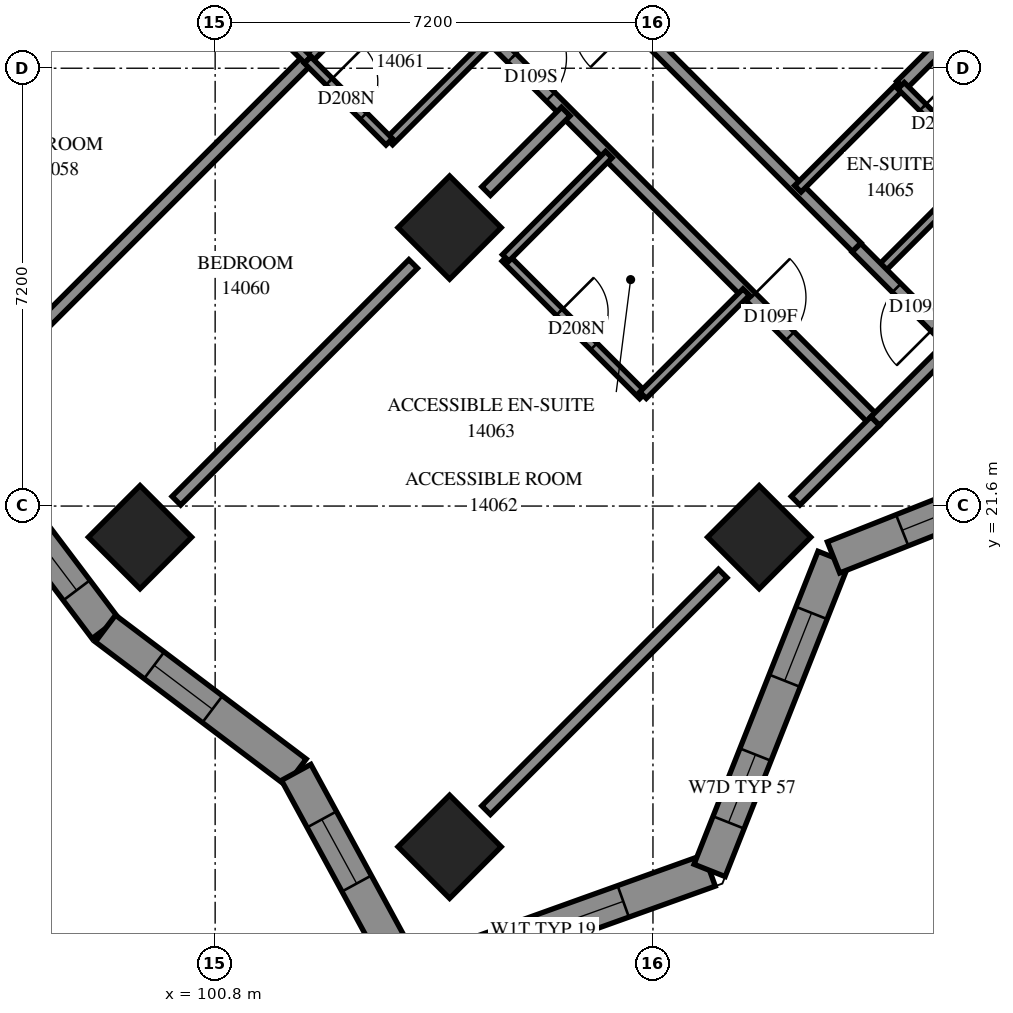
"""IFC4 building model, lengths in metres.
Left out: names, types, materials, properties, quantities, classifications, styles, units other than length and angle.
Written with IfcOpenShell. Run it as: python <this file> out.ifc"""

import sys

from ifc_helpers import new_model, si_unit, direction, frame, frame_2d, origin, origin_2d, place, context, subcontext, project, spatial, polyline, rectangle, outline, extrude, element, fill, save


model = new_model("IFC4")
c1 = context("Model", 3, precision=1e-05, world=origin(), true_north=direction((0.0, 1.0)))
c2 = subcontext(c1, "Body", "Model", "MODEL_VIEW")
j1 = project(units=[si_unit("LENGTHUNIT", "METRE"), si_unit("PLANEANGLEUNIT", "RADIAN")], contexts=[c1])
p1 = place(None, origin())
s1 = spatial("IfcSite", under=j1, at=p1, CompositionType="ELEMENT")
p2 = place(p1, origin())
s2 = spatial("IfcBuilding", under=s1, at=p2, CompositionType="ELEMENT")
p3 = place(p2, frame((0.0, 0.0, 54.2)))
s3 = spatial("IfcBuildingStorey", under=s2, at=p3, CompositionType="ELEMENT", Elevation=54.2)
for number, where, z_axis, x_axis in (
    (1, (104.656, 26.18, 0.0), (0.0, 0.0, 1.0), (0.707, -0.707, 0.0)),
    (2, (99.565, 21.088, 0.0), (0.0, 0.0, 1.0), (0.707, -0.707, 0.0)),
    (3, (109.747, 21.088, 0.0), (0.0, 0.0, 1.0), (0.707, -0.707, 0.0)),
    (4, (104.656, 15.997, 0.0), (0.0, 0.0, 1.0), (0.707, -0.707, 0.0)),
):
    element("IfcColumn", number, at=place(p3, frame(where, z_axis=z_axis, x_axis=x_axis)), inside=s3, PredefinedType="COLUMN", context=c2, shape_type="SweptSolid", body=[
        extrude(rectangle(XDim=1.2, YDim=1.2, at=origin_2d()), origin(), (0.0, 0.0, 1.0), 3.1),
    ])
p4 = place(p3, frame((103.977, 13.831, 0.0), z_axis=(0.0, 0.0, 1.0), x_axis=(0.9412569304, 0.3376912656, 0.0)))
e5 = element("IfcWall", 5, at=p4, inside=s3, PredefinedType="SOLIDWALL", context=c2, shape_type="SweptSolid", body=[
    extrude(outline(polyline([(-0.236, -0.275), (5.388, -0.275), (5.139, 0.275), (0.236, 0.275), (-0.236, -0.275)])), origin(), (0.0, 0.0, 1.0), 3.1),
])
p5 = place(p4, frame((0.955, 0.0, 0.5)))
e6 = element("IfcOpeningElement", 6, at=p5, cuts=e5, PredefinedType="OPENING", context=c2, shape_type="SweptSolid", body=[
    extrude(rectangle(XDim=2.8, YDim=2.45, at=frame_2d((1.4, 1.225))), frame((0.0, 0.285, 0.0), z_axis=(0.0, -1.0, 0.0), x_axis=(1.0, 0.0, 0.0)), (0.0, 0.0, 1.0), 0.57),
])
p6 = place(p3, frame((108.931, 15.608, 0.0), z_axis=(0.0, 0.0, 1.0), x_axis=(0.368236509, 0.9297321514, 0.0)))
e7 = element("IfcWall", 7, at=p6, inside=s3, PredefinedType="SOLIDWALL", context=c2, shape_type="SweptSolid", body=[
    extrude(outline(polyline([(-0.124, -0.275), (5.417, -0.275), (5.655, 0.275), (0.124, 0.275), (-0.124, -0.275)])), origin(), (0.0, 0.0, 1.0), 3.1),
])
p7 = place(p6, frame((0.848, 0.0, 0.5)))
e8 = element("IfcOpeningElement", 8, at=p7, cuts=e7, PredefinedType="OPENING", context=c2, shape_type="SweptSolid", body=[
    extrude(rectangle(XDim=1.2, YDim=2.45, at=frame_2d((0.6, 1.225))), frame((0.0, 0.285, 0.0), z_axis=(0.0, -1.0, 0.0), x_axis=(1.0, 0.0, 0.0)), (0.0, 0.0, 1.0), 0.57),
])
p8 = place(p6, frame((3.354, 0.0, 0.5)))
e9 = element("IfcOpeningElement", 9, at=p8, cuts=e7, PredefinedType="OPENING", context=c2, shape_type="SweptSolid", body=[
    extrude(rectangle(XDim=1.2, YDim=2.45, at=frame_2d((0.6, 1.225))), frame((0.0, 0.285, 0.0), z_axis=(0.0, -1.0, 0.0), x_axis=(1.0, 0.0, 0.0)), (0.0, 0.0, 1.0), 0.57),
])
p9 = place(p3, frame((110.97, 20.755, 0.0), z_axis=(0.0, 0.0, 1.0), x_axis=(0.9297346009, 0.3682303244, 0.0)))
e10 = element("IfcWall", 10, at=p9, inside=s3, PredefinedType="SOLIDWALL", context=c2, shape_type="SweptSolid", body=[
    extrude(outline(polyline([(0.119, -0.275), (5.66, -0.275), (5.411, 0.275), (-0.119, 0.275), (0.119, -0.275)])), origin(), (0.0, 0.0, 1.0), 3.1),
])
p10 = place(p9, frame((1.214, 0.0, 0.5)))
e11 = element("IfcOpeningElement", 11, at=p10, cuts=e10, PredefinedType="OPENING", context=c2, shape_type="SweptSolid", body=[
    extrude(rectangle(XDim=2.8, YDim=2.45, at=frame_2d((1.4, 1.225))), frame((0.0, 0.285, 0.0), z_axis=(0.0, -1.0, 0.0), x_axis=(1.0, 0.0, 0.0)), (0.0, 0.0, 1.0), 0.57),
])
p11 = place(p3, frame((96.642, 22.706, 0.0), z_axis=(0.0, 0.0, 1.0), x_axis=(0.6022004799, -0.7983449017, 0.0)))
e12 = element("IfcWall", 12, at=p11, inside=s3, PredefinedType="SOLIDWALL", context=c2, shape_type="SweptSolid", body=[
    extrude(outline(polyline([(0.038, -0.275), (3.946, -0.275), (3.869, 0.275), (-0.038, 0.275), (0.038, -0.275)])), origin(), (0.0, 0.0, 1.0), 3.1),
])
p12 = place(p11, frame((0.321, 0.0, 0.5)))
e13 = element("IfcOpeningElement", 13, at=p12, cuts=e12, PredefinedType="OPENING", context=c2, shape_type="SweptSolid", body=[
    extrude(rectangle(XDim=2.8, YDim=2.45, at=frame_2d((1.4, 1.225))), frame((0.0, 0.285, 0.0), z_axis=(0.0, -1.0, 0.0), x_axis=(1.0, 0.0, 0.0)), (0.0, 0.0, 1.0), 0.57),
])
p13 = place(p3, frame((98.996, 19.586, 0.0), z_axis=(0.0, 0.0, 1.0), x_axis=(0.7983537644, -0.6021887302, 0.0)))
e14 = element("IfcWall", 14, at=p13, inside=s3, PredefinedType="SOLIDWALL", context=c2, shape_type="SweptSolid", body=[
    extrude(outline(polyline([(-0.038, -0.275), (3.869, -0.275), (3.988, 0.275), (0.038, 0.275), (-0.038, -0.275)])), origin(), (0.0, 0.0, 1.0), 3.1),
])
p14 = place(p13, frame((1.004, 0.0, 0.5)))
e15 = element("IfcOpeningElement", 15, at=p14, cuts=e14, PredefinedType="OPENING", context=c2, shape_type="SweptSolid", body=[
    extrude(rectangle(XDim=1.2, YDim=2.45, at=frame_2d((0.6, 1.225))), frame((0.0, 0.285, 0.0), z_axis=(0.0, -1.0, 0.0), x_axis=(1.0, 0.0, 0.0)), (0.0, 0.0, 1.0), 0.57),
])
p15 = place(p3, frame((102.132, 17.22, 0.0), z_axis=(0.0, 0.0, 1.0), x_axis=(0.478060323, -0.8783270049, 0.0)))
e16 = element("IfcWall", 16, at=p15, inside=s3, PredefinedType="SOLIDWALL", context=c2, shape_type="SweptSolid", body=[
    extrude(outline(polyline([(0.059, -0.275), (4.095, -0.275), (3.623, 0.275), (-0.059, 0.275), (0.059, -0.275)])), origin(), (0.0, 0.0, 1.0), 3.1),
])
p16 = place(p15, frame((0.881, 0.0, 0.5)))
e17 = element("IfcOpeningElement", 17, at=p16, cuts=e16, PredefinedType="OPENING", context=c2, shape_type="SweptSolid", body=[
    extrude(rectangle(XDim=1.2, YDim=2.45, at=frame_2d((0.6, 1.225))), frame((0.0, 0.285, 0.0), z_axis=(0.0, -1.0, 0.0), x_axis=(1.0, 0.0, 0.0)), (0.0, 0.0, 1.0), 0.57),
])
p17 = place(p3, frame((93.481, 41.167, 0.0), z_axis=(0.0, 0.0, 1.0), x_axis=(0.7071067812, -0.7071067812, 0.0)))
e18 = element("IfcWall", 18, at=p17, inside=s3, PredefinedType="PARTITIONING", context=c2, shape_type="SweptSolid", body=[
    extrude(rectangle(XDim=25.699, YDim=0.2, at=frame_2d((12.85, 0.0))), origin(), (0.0, 0.0, 1.0), 3.1),
])
p18 = place(p17, frame((2.8, 0.0, 0.0)))
e19 = element("IfcOpeningElement", 19, at=p18, cuts=e18, PredefinedType="OPENING", context=c2, shape_type="SweptSolid", body=[
    extrude(rectangle(XDim=0.9, YDim=2.1, at=frame_2d((0.45, 1.05))), frame((0.0, 0.11, 0.0), z_axis=(0.0, -1.0, 0.0), x_axis=(1.0, 0.0, 0.0)), (0.0, 0.0, 1.0), 0.22),
])
p19 = place(p17, frame((9.948, 0.0, 0.0)))
e20 = element("IfcOpeningElement", 20, at=p19, cuts=e18, PredefinedType="OPENING", context=c2, shape_type="SweptSolid", body=[
    extrude(rectangle(XDim=0.9, YDim=2.1, at=frame_2d((0.45, 1.05))), frame((0.0, 0.11, 0.0), z_axis=(0.0, -1.0, 0.0), x_axis=(1.0, 0.0, 0.0)), (0.0, 0.0, 1.0), 0.22),
])
p20 = place(p17, frame((11.7, 0.0, 0.0)))
e21 = element("IfcOpeningElement", 21, at=p20, cuts=e18, PredefinedType="OPENING", context=c2, shape_type="SweptSolid", body=[
    extrude(rectangle(XDim=0.9, YDim=2.1, at=frame_2d((0.45, 1.05))), frame((0.0, 0.11, 0.0), z_axis=(0.0, -1.0, 0.0), x_axis=(1.0, 0.0, 0.0)), (0.0, 0.0, 1.0), 0.22),
])
p21 = place(p17, frame((17.25, 0.0, 0.0)))
e22 = element("IfcOpeningElement", 22, at=p21, cuts=e18, PredefinedType="OPENING", context=c2, shape_type="SweptSolid", body=[
    extrude(rectangle(XDim=0.9, YDim=2.1, at=frame_2d((0.45, 1.05))), frame((0.0, 0.11, 0.0), z_axis=(0.0, -1.0, 0.0), x_axis=(1.0, 0.0, 0.0)), (0.0, 0.0, 1.0), 0.22),
])
p22 = place(p17, frame((22.82, 0.0, 0.0)))
e23 = element("IfcOpeningElement", 23, at=p22, cuts=e18, PredefinedType="OPENING", context=c2, shape_type="SweptSolid", body=[
    extrude(rectangle(XDim=0.9, YDim=2.1, at=frame_2d((0.45, 1.05))), frame((0.0, 0.11, 0.0), z_axis=(0.0, -1.0, 0.0), x_axis=(1.0, 0.0, 0.0)), (0.0, 0.0, 1.0), 0.22),
])
p23 = place(p3, frame((111.352, 25.855, 0.0), z_axis=(0.0, 0.0, 1.0), x_axis=(-0.7070418597, 0.7071716967, 0.0)))
e24 = element("IfcWall", 24, at=p23, inside=s3, PredefinedType="PARTITIONING", context=c2, shape_type="SweptSolid", body=[
    extrude(rectangle(XDim=13.864, YDim=0.2, at=frame_2d((6.932, 0.0))), origin(), (0.0, 0.0, 1.0), 3.1),
])
p24 = place(p23, frame((12.564, 0.0, 0.0)))
e25 = element("IfcOpeningElement", 25, at=p24, cuts=e24, PredefinedType="OPENING", context=c2, shape_type="SweptSolid", body=[
    extrude(rectangle(XDim=0.9, YDim=2.1, at=frame_2d((0.45, 1.05))), frame((0.0, 0.11, 0.0), z_axis=(0.0, -1.0, 0.0), x_axis=(1.0, 0.0, 0.0)), (0.0, 0.0, 1.0), 0.22),
])
p25 = place(p23, frame((5.19, 0.0, 0.0)))
e26 = element("IfcOpeningElement", 26, at=p25, cuts=e24, PredefinedType="OPENING", context=c2, shape_type="SweptSolid", body=[
    extrude(rectangle(XDim=1.0, YDim=2.1, at=frame_2d((0.5, 1.05))), frame((0.0, 0.11, 0.0), z_axis=(0.0, -1.0, 0.0), x_axis=(1.0, 0.0, 0.0)), (0.0, 0.0, 1.0), 0.22),
])
p26 = place(p3, frame((96.524, 23.14, 0.0), z_axis=(0.0, 0.0, 1.0), x_axis=(0.7071128779, 0.7071006844, 0.0)))
e27 = element("IfcWall", 27, at=p26, inside=s3, PredefinedType="PARTITIONING", context=c2, shape_type="SweptSolid", body=[
    extrude(rectangle(XDim=8.201, YDim=0.2, at=frame_2d((4.101, 0.0))), origin(), (0.0, 0.0, 1.0), 3.1),
])
p27 = place(p3, frame((100.162, 21.688, 0.0), z_axis=(0.0, 0.0, 1.0), x_axis=(0.7071067812, 0.7071067812, 0.0)))
e28 = element("IfcWall", 28, at=p27, inside=s3, PredefinedType="PARTITIONING", context=c2, shape_type="SweptSolid", body=[
    extrude(rectangle(XDim=5.507, YDim=0.2, at=frame_2d((2.753, 0.0))), origin(), (0.0, 0.0, 1.0), 3.1),
])
p28 = place(p3, frame((105.255, 16.599, 0.0), z_axis=(0.0, 0.0, 1.0), x_axis=(0.7071067812, 0.7071067812, 0.0)))
e29 = element("IfcWall", 29, at=p28, inside=s3, PredefinedType="PARTITIONING", context=c2, shape_type="SweptSolid", body=[
    extrude(rectangle(XDim=5.504, YDim=0.2, at=frame_2d((2.752, 0.0))), origin(), (0.0, 0.0, 1.0), 2.6),
])
p29 = place(p3, frame((95.073, 26.781, 0.0), z_axis=(0.0, 0.0, 1.0), x_axis=(0.7071067812, 0.7071067812, 0.0)))
e30 = element("IfcWall", 30, at=p29, inside=s3, PredefinedType="PARTITIONING", context=c2, shape_type="SweptSolid", body=[
    extrude(rectangle(XDim=5.501, YDim=0.2, at=frame_2d((2.751, 0.0))), origin(), (0.0, 0.0, 1.0), 3.1),
])
p30 = place(p3, frame((112.079, 28.513, 0.0), z_axis=(0.0, 0.0, 1.0), x_axis=(0.7071067812, 0.7071067812, 0.0)))
e31 = element("IfcWall", 31, at=p30, inside=s3, PredefinedType="PARTITIONING", context=c2, shape_type="SweptSolid", body=[
    extrude(rectangle(XDim=3.351, YDim=0.2, at=frame_2d((1.675, 0.0))), origin(), (0.0, 0.0, 1.0), 3.1),
])
p31 = place(p3, frame((105.573, 25.681, 0.0), z_axis=(0.0, 0.0, 1.0), x_axis=(0.7071067812, -0.7071067812, 0.0)))
e32 = element("IfcWall", 32, at=p31, inside=s3, PredefinedType="PARTITIONING", context=c2, shape_type="SweptSolid", body=[
    extrude(rectangle(XDim=3.199, YDim=0.15, at=frame_2d((1.599, 0.0))), origin(), (0.0, 0.0, 1.0), 3.1),
])
p32 = place(p31, frame((1.258, 0.0, 0.0)))
e33 = element("IfcOpeningElement", 33, at=p32, cuts=e32, PredefinedType="OPENING", context=c2, shape_type="SweptSolid", body=[
    extrude(rectangle(XDim=0.8, YDim=2.1, at=frame_2d((0.4, 1.05))), frame((0.0, 0.085, 0.0), z_axis=(0.0, -1.0, 0.0), x_axis=(1.0, 0.0, 0.0)), (0.0, 0.0, 1.0), 0.17),
])
p33 = place(p3, frame((111.725, 25.473, 0.0), z_axis=(0.0, 0.0, 1.0), x_axis=(0.7071067812, 0.7071067812, 0.0)))
e34 = element("IfcWall", 34, at=p33, inside=s3, PredefinedType="PARTITIONING", context=c2, shape_type="SweptSolid", body=[
    extrude(rectangle(XDim=2.401, YDim=0.15, at=frame_2d((1.201, 0.0))), origin(), (0.0, 0.0, 1.0), 3.1),
])
p34 = place(p3, frame((105.578, 25.682, 0.0), z_axis=(0.0, 0.0, 1.0), x_axis=(0.706689978, 0.7075233388, 0.0)))
e35 = element("IfcWall", 35, at=p34, inside=s3, PredefinedType="PARTITIONING", context=c2, shape_type="SweptSolid", body=[
    extrude(rectangle(XDim=2.4, YDim=0.15, at=frame_2d((1.2, 0.0))), origin(), (0.0, 0.0, 1.0), 3.1),
])
for number, where, z_axis, x_axis in (
    (36, (110.383, 26.817, 0.0), (0.0, 0.0, 1.0), (0.707, 0.707, 0.0)),
    (37, (102.323, 28.939, 0.0), (0.0, 0.0, 1.0), (0.707, 0.707, 0.0)),
    (38, (103.665, 27.595, 0.0), (0.0, 0.0, 1.0), (0.707, 0.707, 0.0)),
    (39, (107.837, 23.423, 0.0), (0.0, 0.0, 1.0), (0.707, 0.707, 0.0)),
):
    element("IfcWall", number, at=place(p3, frame(where, z_axis=z_axis, x_axis=x_axis)), inside=s3, PredefinedType="PARTITIONING", context=c2, shape_type="SweptSolid", body=[
        extrude(rectangle(XDim=2.398, YDim=0.15, at=frame_2d((1.199, 0.0))), origin(), (0.0, 0.0, 1.0), 3.1),
    ])
p35 = place(p3, frame((112.925, 24.267, 0.0), z_axis=(0.0, 0.0, 1.0), x_axis=(-0.7068383786, 0.707375082, 0.0)))
e40 = element("IfcWall", 40, at=p35, inside=s3, PredefinedType="PARTITIONING", context=c2, shape_type="SweptSolid", body=[
    extrude(rectangle(XDim=2.236, YDim=0.2, at=frame_2d((1.118, 0.0))), origin(), (0.0, 0.0, 1.0), 3.1),
])
p36 = place(p35, frame((0.4, 0.0, 0.0)))
e41 = element("IfcOpeningElement", 41, at=p36, cuts=e40, PredefinedType="OPENING", context=c2, shape_type="SweptSolid", body=[
    extrude(rectangle(XDim=0.9, YDim=2.1, at=frame_2d((0.45, 1.05))), frame((0.0, 0.11, 0.0), z_axis=(0.0, -1.0, 0.0), x_axis=(1.0, 0.0, 0.0)), (0.0, 0.0, 1.0), 0.22),
])
p37 = place(p3, frame((100.981, 30.283, 0.0), z_axis=(0.0, 0.0, 1.0), x_axis=(0.7076330979, -0.7065800724, 0.0)))
e42 = element("IfcWall", 42, at=p37, inside=s3, PredefinedType="PARTITIONING", context=c2, shape_type="SweptSolid", body=[
    extrude(rectangle(XDim=1.899, YDim=0.15, at=frame_2d((0.95, 0.0))), origin(), (0.0, 0.0, 1.0), 3.1),
])
p38 = place(p37, frame((0.493, 0.0, 0.0)))
e43 = element("IfcOpeningElement", 43, at=p38, cuts=e42, PredefinedType="OPENING", context=c2, shape_type="SweptSolid", body=[
    extrude(rectangle(XDim=0.8, YDim=2.1, at=frame_2d((0.4, 1.05))), frame((0.0, 0.085, 0.0), z_axis=(0.0, -1.0, 0.0), x_axis=(1.0, 0.0, 0.0)), (0.0, 0.0, 1.0), 0.17),
])
p39 = place(p3, frame((102.321, 28.935, 0.0), z_axis=(0.0, 0.0, 1.0), x_axis=(0.7065800724, -0.7076330979, 0.0)))
e44 = element("IfcWall", 44, at=p39, inside=s3, PredefinedType="PARTITIONING", context=c2, shape_type="SweptSolid", body=[
    extrude(rectangle(XDim=1.899, YDim=0.15, at=frame_2d((0.95, 0.0))), origin(), (0.0, 0.0, 1.0), 3.1),
])
p40 = place(p39, frame((0.501, 0.0, 0.0)))
e45 = element("IfcOpeningElement", 45, at=p40, cuts=e44, PredefinedType="OPENING", context=c2, shape_type="SweptSolid", body=[
    extrude(rectangle(XDim=0.8, YDim=2.1, at=frame_2d((0.4, 1.05))), frame((0.0, 0.085, 0.0), z_axis=(0.0, -1.0, 0.0), x_axis=(1.0, 0.0, 0.0)), (0.0, 0.0, 1.0), 0.17),
])
p41 = place(p3, frame((112.08, 28.512, 0.0), z_axis=(0.0, 0.0, 1.0), x_axis=(0.7076330979, -0.7065800724, 0.0)))
e46 = element("IfcWall", 46, at=p41, inside=s3, PredefinedType="PARTITIONING", context=c2, shape_type="SweptSolid", body=[
    extrude(rectangle(XDim=1.899, YDim=0.15, at=frame_2d((0.95, 0.0))), origin(), (0.0, 0.0, 1.0), 3.1),
])
p42 = place(p41, frame((0.505, 0.0, 0.0)))
e47 = element("IfcOpeningElement", 47, at=p42, cuts=e46, PredefinedType="OPENING", context=c2, shape_type="SweptSolid", body=[
    extrude(rectangle(XDim=0.8, YDim=2.1, at=frame_2d((0.4, 1.05))), frame((0.0, 0.085, 0.0), z_axis=(0.0, -1.0, 0.0), x_axis=(1.0, 0.0, 0.0)), (0.0, 0.0, 1.0), 0.17),
])
p43 = place(p3, frame((110.346, 21.689, 0.0), z_axis=(0.0, 0.0, 1.0), x_axis=(0.7071067812, 0.7071067812, 0.0)))
e48 = element("IfcWall", 48, at=p43, inside=s3, PredefinedType="PARTITIONING", context=c2, shape_type="SweptSolid", body=[
    extrude(rectangle(XDim=1.853, YDim=0.2, at=frame_2d((0.926, 0.0))), origin(), (0.0, 0.0, 1.0), 2.6),
])
p44 = place(p3, frame((105.256, 26.78, 0.0), z_axis=(0.0, 0.0, 1.0), x_axis=(0.7076467632, 0.7065663865, 0.0)))
e49 = element("IfcWall", 49, at=p44, inside=s3, PredefinedType="PARTITIONING", context=c2, shape_type="SweptSolid", body=[
    extrude(rectangle(XDim=1.851, YDim=0.2, at=frame_2d((0.926, 0.0))), origin(), (0.0, 0.0, 1.0), 3.1),
])
p45 = place(p3, frame((111.656, 22.998, 0.0), z_axis=(0.0, 0.0, 1.0), x_axis=(0.7071067812, 0.7071067812, 0.0)))
e50 = element("IfcWall", 50, at=p45, inside=s3, PredefinedType="PARTITIONING", context=c2, shape_type="SweptSolid", body=[
    extrude(rectangle(XDim=1.799, YDim=0.2, at=frame_2d((0.899, 0.0))), origin(), (0.0, 0.0, 1.0), 2.6),
])
p46 = place(p5, origin())
e51 = element("IfcWindow", 51, at=p46, inside=s3, PartitioningType="SINGLE_PANEL", PredefinedType="WINDOW", context=c2, shape_type="SweptSolid", body=[
    extrude(rectangle(XDim=2.8, YDim=2.45, at=frame_2d((1.4, 1.225))), frame((0.0, 0.155, 0.0), z_axis=(0.0, -1.0, 0.0), x_axis=(1.0, 0.0, 0.0)), (0.0, 0.0, 1.0), 0.06),
])
fill(e6, e51)
p47 = place(p7, origin())
e52 = element("IfcWindow", 52, at=p47, inside=s3, PartitioningType="SINGLE_PANEL", PredefinedType="WINDOW", context=c2, shape_type="SweptSolid", body=[
    extrude(rectangle(XDim=1.2, YDim=2.45, at=frame_2d((0.6, 1.225))), frame((0.0, 0.155, 0.0), z_axis=(0.0, -1.0, 0.0), x_axis=(1.0, 0.0, 0.0)), (0.0, 0.0, 1.0), 0.06),
])
fill(e8, e52)
p48 = place(p8, origin())
e53 = element("IfcWindow", 53, at=p48, inside=s3, PartitioningType="SINGLE_PANEL", PredefinedType="WINDOW", context=c2, shape_type="SweptSolid", body=[
    extrude(rectangle(XDim=1.2, YDim=2.45, at=frame_2d((0.6, 1.225))), frame((0.0, 0.155, 0.0), z_axis=(0.0, -1.0, 0.0), x_axis=(1.0, 0.0, 0.0)), (0.0, 0.0, 1.0), 0.06),
])
fill(e9, e53)
p49 = place(p10, origin())
e54 = element("IfcWindow", 54, at=p49, inside=s3, PartitioningType="SINGLE_PANEL", PredefinedType="WINDOW", context=c2, shape_type="SweptSolid", body=[
    extrude(rectangle(XDim=2.8, YDim=2.45, at=frame_2d((1.4, 1.225))), frame((0.0, 0.155, 0.0), z_axis=(0.0, -1.0, 0.0), x_axis=(1.0, 0.0, 0.0)), (0.0, 0.0, 1.0), 0.06),
])
fill(e11, e54)
p50 = place(p12, origin())
e55 = element("IfcWindow", 55, at=p50, inside=s3, PartitioningType="SINGLE_PANEL", PredefinedType="WINDOW", context=c2, shape_type="SweptSolid", body=[
    extrude(rectangle(XDim=2.8, YDim=2.45, at=frame_2d((1.4, 1.225))), frame((0.0, 0.155, 0.0), z_axis=(0.0, -1.0, 0.0), x_axis=(1.0, 0.0, 0.0)), (0.0, 0.0, 1.0), 0.06),
])
fill(e13, e55)
p51 = place(p14, origin())
e56 = element("IfcWindow", 56, at=p51, inside=s3, PartitioningType="SINGLE_PANEL", PredefinedType="WINDOW", context=c2, shape_type="SweptSolid", body=[
    extrude(rectangle(XDim=1.2, YDim=2.45, at=frame_2d((0.6, 1.225))), frame((0.0, 0.155, 0.0), z_axis=(0.0, -1.0, 0.0), x_axis=(1.0, 0.0, 0.0)), (0.0, 0.0, 1.0), 0.06),
])
fill(e15, e56)
p52 = place(p16, origin())
e57 = element("IfcWindow", 57, at=p52, inside=s3, PartitioningType="SINGLE_PANEL", PredefinedType="WINDOW", context=c2, shape_type="SweptSolid", body=[
    extrude(rectangle(XDim=1.2, YDim=2.45, at=frame_2d((0.6, 1.225))), frame((0.0, 0.155, 0.0), z_axis=(0.0, -1.0, 0.0), x_axis=(1.0, 0.0, 0.0)), (0.0, 0.0, 1.0), 0.06),
])
fill(e17, e57)
p53 = place(p21, origin())
e58 = element("IfcDoor", 58, at=p53, inside=s3, OperationType="SINGLE_SWING_LEFT", PredefinedType="DOOR", context=c2, shape_type="SweptSolid", body=[
    extrude(rectangle(XDim=0.9, YDim=2.1, at=frame_2d((0.45, 1.05))), frame((0.0, 0.025, 0.0), z_axis=(0.0, -1.0, 0.0), x_axis=(1.0, 0.0, 0.0)), (0.0, 0.0, 1.0), 0.05),
])
fill(e22, e58)
p54 = place(p40, origin())
e59 = element("IfcDoor", 59, at=p54, inside=s3, OperationType="SINGLE_SWING_RIGHT", PredefinedType="DOOR", context=c2, shape_type="SweptSolid", body=[
    extrude(rectangle(XDim=0.8, YDim=2.1, at=frame_2d((0.4, 1.05))), frame((0.0, 0.025, 0.0), z_axis=(0.0, -1.0, 0.0), x_axis=(1.0, 0.0, 0.0)), (0.0, 0.0, 1.0), 0.05),
])
fill(e45, e59)
p55 = place(p22, origin())
e60 = element("IfcDoor", 60, at=p55, inside=s3, OperationType="SINGLE_SWING_RIGHT", PredefinedType="DOOR", context=c2, shape_type="SweptSolid", body=[
    extrude(rectangle(XDim=0.9, YDim=2.1, at=frame_2d((0.45, 1.05))), frame((0.0, 0.025, 0.0), z_axis=(0.0, -1.0, 0.0), x_axis=(1.0, 0.0, 0.0)), (0.0, 0.0, 1.0), 0.05),
])
fill(e23, e60)
p56 = place(p32, origin())
e61 = element("IfcDoor", 61, at=p56, inside=s3, OperationType="SINGLE_SWING_RIGHT", PredefinedType="DOOR", context=c2, shape_type="SweptSolid", body=[
    extrude(rectangle(XDim=0.8, YDim=2.1, at=frame_2d((0.4, 1.05))), frame((0.0, 0.025, 0.0), z_axis=(0.0, -1.0, 0.0), x_axis=(1.0, 0.0, 0.0)), (0.0, 0.0, 1.0), 0.05),
])
fill(e33, e61)
p57 = place(p36, origin())
e62 = element("IfcDoor", 62, at=p57, inside=s3, OperationType="SINGLE_SWING_RIGHT", PredefinedType="DOOR", context=c2, shape_type="SweptSolid", body=[
    extrude(rectangle(XDim=0.9, YDim=2.1, at=frame_2d((0.45, 1.05))), frame((0.0, 0.025, 0.0), z_axis=(0.0, -1.0, 0.0), x_axis=(1.0, 0.0, 0.0)), (0.0, 0.0, 1.0), 0.05),
])
fill(e41, e62)
p58 = place(p42, origin())
e63 = element("IfcDoor", 63, at=p58, inside=s3, OperationType="SINGLE_SWING_RIGHT", PredefinedType="DOOR", context=c2, shape_type="SweptSolid", body=[
    extrude(rectangle(XDim=0.8, YDim=2.1, at=frame_2d((0.4, 1.05))), frame((0.0, 0.025, 0.0), z_axis=(0.0, -1.0, 0.0), x_axis=(1.0, 0.0, 0.0)), (0.0, 0.0, 1.0), 0.05),
])
fill(e47, e63)
save(model, sys.argv[1])
